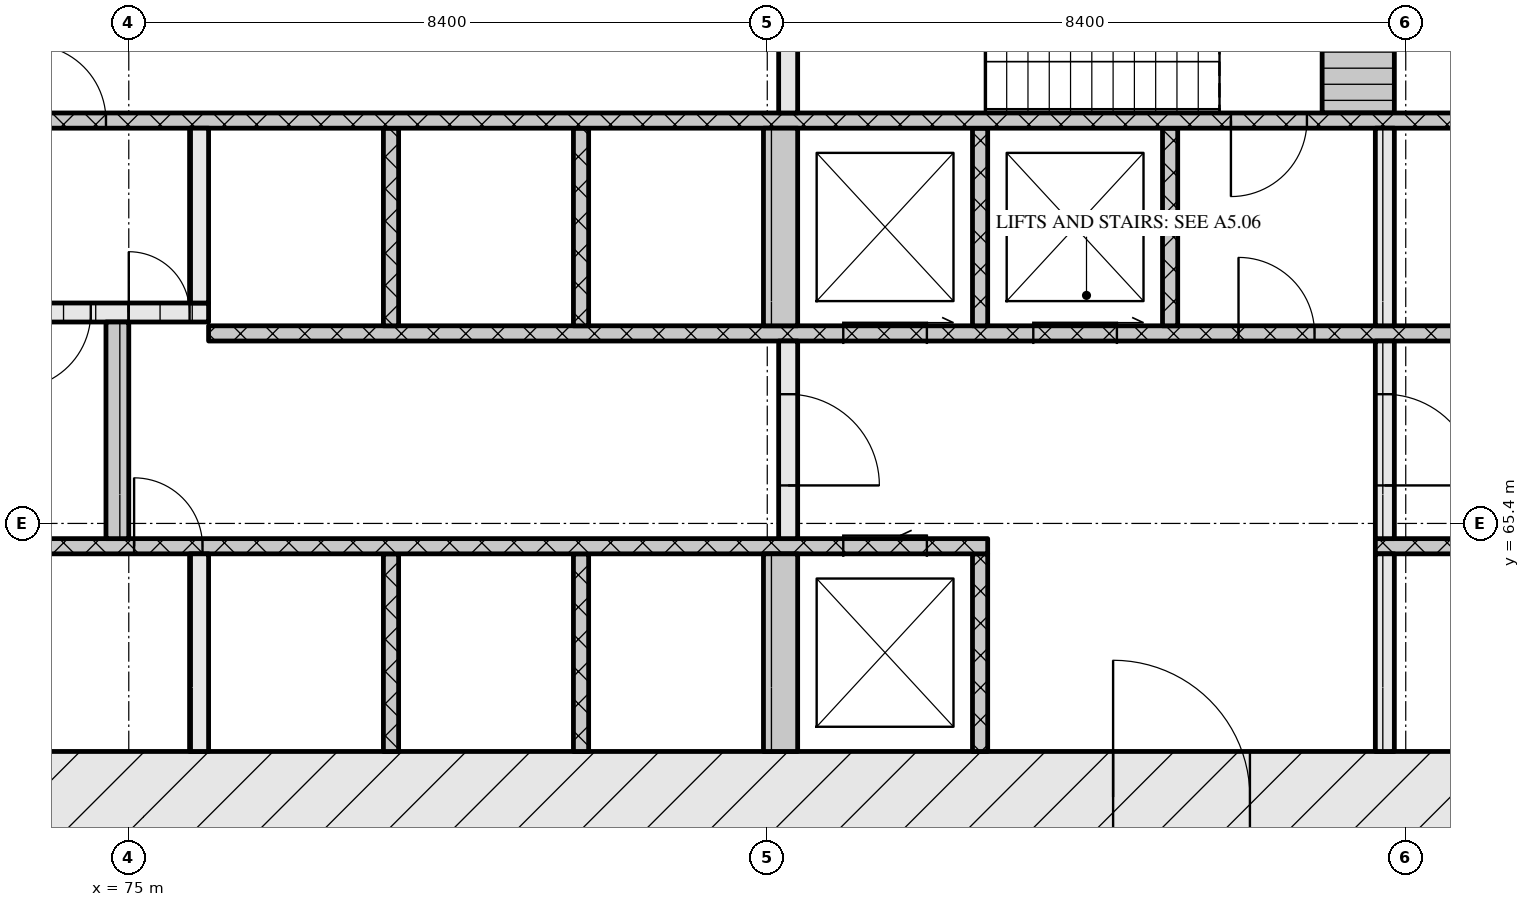
"""IFC4 building model, lengths in metres.
Left out: names, types, materials, properties, quantities, classifications, styles, units other than length and angle.
Written with IfcOpenShell. Run it as: python <this file> out.ifc"""

import sys

from ifc_helpers import new_model, si_unit, direction, frame, frame_2d, origin, place, context, subcontext, project, spatial, rectangle, extrude, element, fill, save


model = new_model("IFC4")
c1 = context("Model", 3, precision=1e-05, world=origin(), true_north=direction((0.0, 1.0)))
c2 = subcontext(c1, "Body", "Model", "MODEL_VIEW")
j1 = project(units=[si_unit("LENGTHUNIT", "METRE"), si_unit("PLANEANGLEUNIT", "RADIAN")], contexts=[c1])
p1 = place(None, origin())
s1 = spatial("IfcSite", under=j1, at=p1, CompositionType="ELEMENT")
p2 = place(p1, origin())
s2 = spatial("IfcBuilding", under=s1, at=p2, CompositionType="ELEMENT")
p3 = place(p2, frame((0.0, 0.0, 28.2)))
s3 = spatial("IfcBuildingStorey", under=s2, at=p3, CompositionType="ELEMENT", Elevation=28.2)
p4 = place(p3, frame((66.6, 61.8, 0.0), z_axis=(0.0, 0.0, 1.0), x_axis=(1.0, 0.0, 0.0)))
e1 = element("IfcWall", 1, at=p4, inside=s3, PredefinedType="SOLIDWALL", context=c2, shape_type="SweptSolid", body=[
    extrude(rectangle(XDim=42.0, YDim=1.2, at=frame_2d((21.0, 0.0))), origin(), (0.0, 0.0, 1.0), 4.2),
])
p5 = place(p4, frame((21.35, 0.0, 0.0)))
e2 = element("IfcOpeningElement", 2, at=p5, cuts=e1, PredefinedType="OPENING", context=c2, shape_type="SweptSolid", body=[
    extrude(rectangle(XDim=1.8, YDim=2.1, at=frame_2d((0.9, 1.05))), frame((0.0, 0.61, 0.0), z_axis=(0.0, -1.0, 0.0), x_axis=(1.0, 0.0, 0.0)), (0.0, 0.0, 1.0), 1.22),
])
p6 = place(p3, frame((75.925, 62.4, 0.0), z_axis=(0.0, 0.0, 1.0), x_axis=(0.0, 1.0, 0.0)))
e3 = element("IfcWall", 3, at=p6, inside=s3, PredefinedType="SOLIDWALL", context=c2, shape_type="SweptSolid", body=[
    extrude(rectangle(XDim=2.6, YDim=0.25, at=frame_2d((1.3, 0.0))), origin(), (0.0, 0.0, 1.0), 4.2),
])
for number, where, z_axis, x_axis in (
    (4, (78.45, 62.4, 0.0), (0.0, 0.0, 1.0), (0.0, 1.0, 0.0)),
    (5, (80.95, 62.4, 0.0), (0.0, 0.0, 1.0), (0.0, 1.0, 0.0)),
):
    element("IfcWall", number, at=place(p3, frame(where, z_axis=z_axis, x_axis=x_axis)), inside=s3, PredefinedType="SOLIDWALL", context=c2, shape_type="SweptSolid", body=[
        extrude(rectangle(XDim=2.6, YDim=0.2, at=frame_2d((1.3, 0.0))), origin(), (0.0, 0.0, 1.0), 4.2),
    ])
p7 = place(p3, frame((83.575, 62.4, 0.0), z_axis=(0.0, 0.0, 1.0), x_axis=(0.0, 1.0, 0.0)))
e6 = element("IfcWall", 6, at=p7, inside=s3, PredefinedType="SOLIDWALL", context=c2, shape_type="SweptSolid", body=[
    extrude(rectangle(XDim=2.6, YDim=0.45, at=frame_2d((1.3, 0.0))), origin(), (0.0, 0.0, 1.0), 4.2),
])
p8 = place(p3, frame((86.2, 62.4, 0.0), z_axis=(0.0, 0.0, 1.0), x_axis=(0.0, 1.0, 0.0)))
e7 = element("IfcWall", 7, at=p8, inside=s3, PredefinedType="SOLIDWALL", context=c2, shape_type="SweptSolid", body=[
    extrude(rectangle(XDim=2.6, YDim=0.2, at=frame_2d((1.3, 0.0))), origin(), (0.0, 0.0, 1.0), 4.2),
])
p9 = place(p3, frame((91.525, 62.4, 0.0), z_axis=(0.0, 0.0, 1.0), x_axis=(0.0, 1.0, 0.0)))
e8 = element("IfcWall", 8, at=p9, inside=s3, PredefinedType="SOLIDWALL", context=c2, shape_type="SweptSolid", body=[
    extrude(rectangle(XDim=2.6, YDim=0.25, at=frame_2d((1.3, 0.0))), origin(), (0.0, 0.0, 1.0), 4.2),
])
p10 = place(p3, frame((67.8, 65.1, 0.0), z_axis=(0.0, 0.0, 1.0), x_axis=(1.0, 0.0, 0.0)))
e9 = element("IfcWall", 9, at=p10, inside=s3, PredefinedType="SOLIDWALL", context=c2, shape_type="SweptSolid", body=[
    extrude(rectangle(XDim=18.5, YDim=0.2, at=frame_2d((9.25, 0.0))), origin(), (0.0, 0.0, 1.0), 4.2),
])
p11 = place(p10, frame((7.27, 0.0, 0.0)))
e10 = element("IfcOpeningElement", 10, at=p11, cuts=e9, PredefinedType="OPENING", context=c2, shape_type="SweptSolid", body=[
    extrude(rectangle(XDim=0.9, YDim=2.1, at=frame_2d((0.45, 1.05))), frame((0.0, 0.11, 0.0), z_axis=(0.0, -1.0, 0.0), x_axis=(1.0, 0.0, 0.0)), (0.0, 0.0, 1.0), 0.22),
])
p12 = place(p10, frame((16.6, 0.0, 0.0)))
e11 = element("IfcOpeningElement", 11, at=p12, cuts=e9, PredefinedType="OPENING", context=c2, shape_type="SweptSolid", body=[
    extrude(rectangle(XDim=1.1, YDim=2.1, at=frame_2d((0.55, 1.05))), frame((0.0, 0.11, 0.0), z_axis=(0.0, -1.0, 0.0), x_axis=(1.0, 0.0, 0.0)), (0.0, 0.0, 1.0), 0.22),
])
p13 = place(p3, frame((91.4, 65.1, 0.0), z_axis=(0.0, 0.0, 1.0), x_axis=(1.0, 0.0, 0.0)))
e12 = element("IfcWall", 12, at=p13, inside=s3, PredefinedType="SOLIDWALL", context=c2, shape_type="SweptSolid", body=[
    extrude(rectangle(XDim=16.0, YDim=0.2, at=frame_2d((8.0, 0.0))), origin(), (0.0, 0.0, 1.0), 4.2),
])
p14 = place(p13, frame((7.83, 0.0, 0.0)))
e13 = element("IfcOpeningElement", 13, at=p14, cuts=e12, PredefinedType="OPENING", context=c2, shape_type="SweptSolid", body=[
    extrude(rectangle(XDim=0.9, YDim=2.1, at=frame_2d((0.45, 1.05))), frame((0.0, 0.11, 0.0), z_axis=(0.0, -1.0, 0.0), x_axis=(1.0, 0.0, 0.0)), (0.0, 0.0, 1.0), 0.22),
])
p15 = place(p3, frame((74.85, 65.2, 0.0), z_axis=(0.0, 0.0, 1.0), x_axis=(0.0, 1.0, 0.0)))
e14 = element("IfcWall", 14, at=p15, inside=s3, PredefinedType="SOLIDWALL", context=c2, shape_type="SweptSolid", body=[
    extrude(rectangle(XDim=2.85, YDim=0.3, at=frame_2d((1.425, 0.0))), origin(), (0.0, 0.0, 1.0), 4.2),
])
p16 = place(p3, frame((83.675, 65.2, 0.0), z_axis=(0.0, 0.0, 1.0), x_axis=(0.0, 1.0, 0.0)))
e15 = element("IfcWall", 15, at=p16, inside=s3, PredefinedType="SOLIDWALL", context=c2, shape_type="SweptSolid", body=[
    extrude(rectangle(XDim=2.6, YDim=0.25, at=frame_2d((1.3, 0.0))), origin(), (0.0, 0.0, 1.0), 4.2),
])
p17 = place(p16, frame((0.7, 0.0, 0.0)))
e16 = element("IfcOpeningElement", 16, at=p17, cuts=e15, PredefinedType="OPENING", context=c2, shape_type="SweptSolid", body=[
    extrude(rectangle(XDim=1.2, YDim=2.1, at=frame_2d((0.6, 1.05))), frame((0.0, 0.135, 0.0), z_axis=(0.0, -1.0, 0.0), x_axis=(1.0, 0.0, 0.0)), (0.0, 0.0, 1.0), 0.27),
])
p18 = place(p3, frame((91.525, 65.2, 0.0), z_axis=(0.0, 0.0, 1.0), x_axis=(0.0, 1.0, 0.0)))
e17 = element("IfcWall", 17, at=p18, inside=s3, PredefinedType="SOLIDWALL", context=c2, shape_type="SweptSolid", body=[
    extrude(rectangle(XDim=2.6, YDim=0.25, at=frame_2d((1.3, 0.0))), origin(), (0.0, 0.0, 1.0), 4.2),
])
p19 = place(p18, frame((0.7, 0.0, 0.0)))
e18 = element("IfcOpeningElement", 18, at=p19, cuts=e17, PredefinedType="OPENING", context=c2, shape_type="SweptSolid", body=[
    extrude(rectangle(XDim=1.2, YDim=2.1, at=frame_2d((0.6, 1.05))), frame((0.0, 0.135, 0.0), z_axis=(0.0, -1.0, 0.0), x_axis=(1.0, 0.0, 0.0)), (0.0, 0.0, 1.0), 0.27),
])
p20 = place(p3, frame((76.05, 67.9, 0.0), z_axis=(0.0, 0.0, 1.0), x_axis=(1.0, 0.0, 0.0)))
e19 = element("IfcWall", 19, at=p20, inside=s3, PredefinedType="SOLIDWALL", context=c2, shape_type="SweptSolid", body=[
    extrude(rectangle(XDim=23.1, YDim=0.2, at=frame_2d((11.55, 0.0))), origin(), (0.0, 0.0, 1.0), 4.2),
])
p21 = place(p20, frame((8.35, 0.0, 0.0)))
e20 = element("IfcOpeningElement", 20, at=p21, cuts=e19, PredefinedType="OPENING", context=c2, shape_type="SweptSolid", body=[
    extrude(rectangle(XDim=1.1, YDim=2.1, at=frame_2d((0.55, 1.05))), frame((0.0, 0.11, 0.0), z_axis=(0.0, -1.0, 0.0), x_axis=(1.0, 0.0, 0.0)), (0.0, 0.0, 1.0), 0.22),
])
p22 = place(p20, frame((10.85, 0.0, 0.0)))
e21 = element("IfcOpeningElement", 21, at=p22, cuts=e19, PredefinedType="OPENING", context=c2, shape_type="SweptSolid", body=[
    extrude(rectangle(XDim=1.1, YDim=2.1, at=frame_2d((0.55, 1.05))), frame((0.0, 0.11, 0.0), z_axis=(0.0, -1.0, 0.0), x_axis=(1.0, 0.0, 0.0)), (0.0, 0.0, 1.0), 0.22),
])
p23 = place(p20, frame((13.55, 0.0, 0.0)))
e22 = element("IfcOpeningElement", 22, at=p23, cuts=e19, PredefinedType="OPENING", context=c2, shape_type="SweptSolid", body=[
    extrude(rectangle(XDim=1.0, YDim=2.1, at=frame_2d((0.5, 1.05))), frame((0.0, 0.11, 0.0), z_axis=(0.0, -1.0, 0.0), x_axis=(1.0, 0.0, 0.0)), (0.0, 0.0, 1.0), 0.22),
])
for number, where, z_axis, x_axis in (
    (23, (78.45, 68.0, 0.0), (0.0, 0.0, 1.0), (0.0, 1.0, 0.0)),
    (24, (80.95, 68.0, 0.0), (0.0, 0.0, 1.0), (0.0, 1.0, 0.0)),
):
    element("IfcWall", number, at=place(p3, frame(where, z_axis=z_axis, x_axis=x_axis)), inside=s3, PredefinedType="SOLIDWALL", context=c2, shape_type="SweptSolid", body=[
        extrude(rectangle(XDim=2.6, YDim=0.2, at=frame_2d((1.3, 0.0))), origin(), (0.0, 0.0, 1.0), 4.2),
    ])
p24 = place(p3, frame((83.575, 68.0, 0.0), z_axis=(0.0, 0.0, 1.0), x_axis=(0.0, 1.0, 0.0)))
e25 = element("IfcWall", 25, at=p24, inside=s3, PredefinedType="SOLIDWALL", context=c2, shape_type="SweptSolid", body=[
    extrude(rectangle(XDim=2.6, YDim=0.45, at=frame_2d((1.3, 0.0))), origin(), (0.0, 0.0, 1.0), 4.2),
])
for number, where, z_axis, x_axis in (
    (26, (86.2, 68.0, 0.0), (0.0, 0.0, 1.0), (0.0, 1.0, 0.0)),
    (27, (88.7, 68.0, 0.0), (0.0, 0.0, 1.0), (0.0, 1.0, 0.0)),
):
    element("IfcWall", number, at=place(p3, frame(where, z_axis=z_axis, x_axis=x_axis)), inside=s3, PredefinedType="SOLIDWALL", context=c2, shape_type="SweptSolid", body=[
        extrude(rectangle(XDim=2.6, YDim=0.2, at=frame_2d((1.3, 0.0))), origin(), (0.0, 0.0, 1.0), 4.2),
    ])
p25 = place(p3, frame((91.525, 68.0, 0.0), z_axis=(0.0, 0.0, 1.0), x_axis=(0.0, 1.0, 0.0)))
e28 = element("IfcWall", 28, at=p25, inside=s3, PredefinedType="SOLIDWALL", context=c2, shape_type="SweptSolid", body=[
    extrude(rectangle(XDim=2.6, YDim=0.25, at=frame_2d((1.3, 0.0))), origin(), (0.0, 0.0, 1.0), 4.2),
])
p26 = place(p3, frame((67.8, 68.175, 0.0), z_axis=(0.0, 0.0, 1.0), x_axis=(1.0, 0.0, 0.0)))
e29 = element("IfcWall", 29, at=p26, inside=s3, PredefinedType="SOLIDWALL", context=c2, shape_type="SweptSolid", body=[
    extrude(rectangle(XDim=8.25, YDim=0.25, at=frame_2d((4.125, 0.0))), origin(), (0.0, 0.0, 1.0), 4.2),
])
p27 = place(p26, frame((5.7, 0.0, 0.0)))
e30 = element("IfcOpeningElement", 30, at=p27, cuts=e29, PredefinedType="OPENING", context=c2, shape_type="SweptSolid", body=[
    extrude(rectangle(XDim=1.0, YDim=2.1, at=frame_2d((0.5, 1.05))), frame((0.0, 0.135, 0.0), z_axis=(0.0, -1.0, 0.0), x_axis=(1.0, 0.0, 0.0)), (0.0, 0.0, 1.0), 0.27),
])
p28 = place(p26, frame((7.2, 0.0, 0.0)))
e31 = element("IfcOpeningElement", 31, at=p28, cuts=e29, PredefinedType="OPENING", context=c2, shape_type="SweptSolid", body=[
    extrude(rectangle(XDim=0.8, YDim=2.1, at=frame_2d((0.4, 1.05))), frame((0.0, 0.135, 0.0), z_axis=(0.0, -1.0, 0.0), x_axis=(1.0, 0.0, 0.0)), (0.0, 0.0, 1.0), 0.27),
])
p29 = place(p3, frame((75.925, 68.3, 0.0), z_axis=(0.0, 0.0, 1.0), x_axis=(0.0, 1.0, 0.0)))
e32 = element("IfcWall", 32, at=p29, inside=s3, PredefinedType="SOLIDWALL", context=c2, shape_type="SweptSolid", body=[
    extrude(rectangle(XDim=2.3, YDim=0.25, at=frame_2d((1.15, 0.0))), origin(), (0.0, 0.0, 1.0), 4.2),
])
p30 = place(p3, frame((67.8, 70.7, 0.0), z_axis=(0.0, 0.0, 1.0), x_axis=(1.0, 0.0, 0.0)))
e33 = element("IfcWall", 33, at=p30, inside=s3, PredefinedType="SOLIDWALL", context=c2, shape_type="SweptSolid", body=[
    extrude(rectangle(XDim=39.6, YDim=0.2, at=frame_2d((19.8, 0.0))), origin(), (0.0, 0.0, 1.0), 4.2),
])
p31 = place(p30, frame((0.65, 0.0, 0.0)))
e34 = element("IfcOpeningElement", 34, at=p31, cuts=e33, PredefinedType="OPENING", context=c2, shape_type="SweptSolid", body=[
    extrude(rectangle(XDim=1.1, YDim=2.1, at=frame_2d((0.55, 1.05))), frame((0.0, 0.11, 0.0), z_axis=(0.0, -1.0, 0.0), x_axis=(1.0, 0.0, 0.0)), (0.0, 0.0, 1.0), 0.22),
])
p32 = place(p30, frame((3.25, 0.0, 0.0)))
e35 = element("IfcOpeningElement", 35, at=p32, cuts=e33, PredefinedType="OPENING", context=c2, shape_type="SweptSolid", body=[
    extrude(rectangle(XDim=1.1, YDim=2.1, at=frame_2d((0.55, 1.05))), frame((0.0, 0.11, 0.0), z_axis=(0.0, -1.0, 0.0), x_axis=(1.0, 0.0, 0.0)), (0.0, 0.0, 1.0), 0.22),
])
p33 = place(p30, frame((5.9, 0.0, 0.0)))
e36 = element("IfcOpeningElement", 36, at=p33, cuts=e33, PredefinedType="OPENING", context=c2, shape_type="SweptSolid", body=[
    extrude(rectangle(XDim=1.0, YDim=2.1, at=frame_2d((0.5, 1.05))), frame((0.0, 0.11, 0.0), z_axis=(0.0, -1.0, 0.0), x_axis=(1.0, 0.0, 0.0)), (0.0, 0.0, 1.0), 0.22),
])
p34 = place(p30, frame((21.7, 0.0, 0.0)))
e37 = element("IfcOpeningElement", 37, at=p34, cuts=e33, PredefinedType="OPENING", context=c2, shape_type="SweptSolid", body=[
    extrude(rectangle(XDim=1.0, YDim=2.1, at=frame_2d((0.5, 1.05))), frame((0.0, 0.11, 0.0), z_axis=(0.0, -1.0, 0.0), x_axis=(1.0, 0.0, 0.0)), (0.0, 0.0, 1.0), 0.22),
])
p35 = place(p30, frame((32.7, 0.0, 0.0)))
e38 = element("IfcOpeningElement", 38, at=p35, cuts=e33, PredefinedType="OPENING", context=c2, shape_type="SweptSolid", body=[
    extrude(rectangle(XDim=1.0, YDim=2.1, at=frame_2d((0.5, 1.05))), frame((0.0, 0.11, 0.0), z_axis=(0.0, -1.0, 0.0), x_axis=(1.0, 0.0, 0.0)), (0.0, 0.0, 1.0), 0.22),
])
p36 = place(p30, frame((35.25, 0.0, 0.0)))
e39 = element("IfcOpeningElement", 39, at=p36, cuts=e33, PredefinedType="OPENING", context=c2, shape_type="SweptSolid", body=[
    extrude(rectangle(XDim=1.1, YDim=2.1, at=frame_2d((0.55, 1.05))), frame((0.0, 0.11, 0.0), z_axis=(0.0, -1.0, 0.0), x_axis=(1.0, 0.0, 0.0)), (0.0, 0.0, 1.0), 0.22),
])
p37 = place(p30, frame((37.85, 0.0, 0.0)))
e40 = element("IfcOpeningElement", 40, at=p37, cuts=e33, PredefinedType="OPENING", context=c2, shape_type="SweptSolid", body=[
    extrude(rectangle(XDim=1.1, YDim=2.1, at=frame_2d((0.55, 1.05))), frame((0.0, 0.11, 0.0), z_axis=(0.0, -1.0, 0.0), x_axis=(1.0, 0.0, 0.0)), (0.0, 0.0, 1.0), 0.22),
])
p38 = place(p3, frame((83.675, 70.8, 0.0), z_axis=(0.0, 0.0, 1.0), x_axis=(0.0, 1.0, 0.0)))
e41 = element("IfcWall", 41, at=p38, inside=s3, PredefinedType="SOLIDWALL", context=c2, shape_type="SweptSolid", body=[
    extrude(rectangle(XDim=1.2, YDim=0.25, at=frame_2d((0.6, 0.0))), origin(), (0.0, 0.0, 1.0), 4.2),
])
p39 = place(p3, frame((91.175, 70.8, 0.0), z_axis=(0.0, 0.0, 1.0), x_axis=(0.0, 1.0, 0.0)))
e42 = element("IfcWall", 42, at=p39, inside=s3, PredefinedType="SOLIDWALL", context=c2, shape_type="SweptSolid", body=[
    extrude(rectangle(XDim=2.95, YDim=0.95, at=frame_2d((1.475, 0.0))), origin(), (0.0, 0.0, 1.0), 4.2),
])
p40 = place(p5, origin())
e43 = element("IfcDoor", 43, at=p40, inside=s3, OperationType="DOUBLE_DOOR_SINGLE_SWING", PredefinedType="DOOR", context=c2, shape_type="SweptSolid", body=[
    extrude(rectangle(XDim=1.8, YDim=2.1, at=frame_2d((0.9, 1.05))), frame((0.0, 0.025, 0.0), z_axis=(0.0, -1.0, 0.0), x_axis=(1.0, 0.0, 0.0)), (0.0, 0.0, 1.0), 0.05),
])
fill(e2, e43)
p41 = place(p11, origin())
e44 = element("IfcDoor", 44, at=p41, inside=s3, OperationType="SINGLE_SWING_LEFT", PredefinedType="DOOR", context=c2, shape_type="SweptSolid", body=[
    extrude(rectangle(XDim=0.9, YDim=2.1, at=frame_2d((0.45, 1.05))), frame((0.0, 0.025, 0.0), z_axis=(0.0, -1.0, 0.0), x_axis=(1.0, 0.0, 0.0)), (0.0, 0.0, 1.0), 0.05),
])
fill(e10, e44)
p42 = place(p12, origin())
e45 = element("IfcDoor", 45, at=p42, inside=s3, OperationType="SLIDING_TO_LEFT", PredefinedType="DOOR", context=c2, shape_type="SweptSolid", body=[
    extrude(rectangle(XDim=1.1, YDim=2.1, at=frame_2d((0.55, 1.05))), frame((0.0, 0.025, 0.0), z_axis=(0.0, -1.0, 0.0), x_axis=(1.0, 0.0, 0.0)), (0.0, 0.0, 1.0), 0.05),
])
fill(e11, e45)
p43 = place(p17, origin())
e46 = element("IfcDoor", 46, at=p43, inside=s3, OperationType="SINGLE_SWING_RIGHT", PredefinedType="DOOR", context=c2, shape_type="SweptSolid", body=[
    extrude(rectangle(XDim=1.2, YDim=2.1, at=frame_2d((0.6, 1.05))), frame((0.0, 0.025, 0.0), z_axis=(0.0, -1.0, 0.0), x_axis=(1.0, 0.0, 0.0)), (0.0, 0.0, 1.0), 0.05),
])
fill(e16, e46)
p44 = place(p19, origin())
e47 = element("IfcDoor", 47, at=p44, inside=s3, OperationType="SINGLE_SWING_RIGHT", PredefinedType="DOOR", context=c2, shape_type="SweptSolid", body=[
    extrude(rectangle(XDim=1.2, YDim=2.1, at=frame_2d((0.6, 1.05))), frame((0.0, 0.025, 0.0), z_axis=(0.0, -1.0, 0.0), x_axis=(1.0, 0.0, 0.0)), (0.0, 0.0, 1.0), 0.05),
])
fill(e18, e47)
p45 = place(p21, origin())
e48 = element("IfcDoor", 48, at=p45, inside=s3, OperationType="SLIDING_TO_RIGHT", PredefinedType="DOOR", context=c2, shape_type="SweptSolid", body=[
    extrude(rectangle(XDim=1.1, YDim=2.1, at=frame_2d((0.55, 1.05))), frame((0.0, 0.025, 0.0), z_axis=(0.0, -1.0, 0.0), x_axis=(1.0, 0.0, 0.0)), (0.0, 0.0, 1.0), 0.05),
])
fill(e20, e48)
p46 = place(p22, origin())
e49 = element("IfcDoor", 49, at=p46, inside=s3, OperationType="SLIDING_TO_RIGHT", PredefinedType="DOOR", context=c2, shape_type="SweptSolid", body=[
    extrude(rectangle(XDim=1.1, YDim=2.1, at=frame_2d((0.55, 1.05))), frame((0.0, 0.025, 0.0), z_axis=(0.0, -1.0, 0.0), x_axis=(1.0, 0.0, 0.0)), (0.0, 0.0, 1.0), 0.05),
])
fill(e21, e49)
p47 = place(p23, origin())
e50 = element("IfcDoor", 50, at=p47, inside=s3, OperationType="SINGLE_SWING_LEFT", PredefinedType="DOOR", context=c2, shape_type="SweptSolid", body=[
    extrude(rectangle(XDim=1.0, YDim=2.1, at=frame_2d((0.5, 1.05))), frame((0.0, 0.025, 0.0), z_axis=(0.0, -1.0, 0.0), x_axis=(1.0, 0.0, 0.0)), (0.0, 0.0, 1.0), 0.05),
])
fill(e22, e50)
p48 = place(p27, origin())
e51 = element("IfcDoor", 51, at=p48, inside=s3, OperationType="SINGLE_SWING_RIGHT", PredefinedType="DOOR", context=c2, shape_type="SweptSolid", body=[
    extrude(rectangle(XDim=1.0, YDim=2.1, at=frame_2d((0.5, 1.05))), frame((0.0, 0.025, 0.0), z_axis=(0.0, -1.0, 0.0), x_axis=(1.0, 0.0, 0.0)), (0.0, 0.0, 1.0), 0.05),
])
fill(e30, e51)
p49 = place(p28, origin())
e52 = element("IfcDoor", 52, at=p49, inside=s3, OperationType="SINGLE_SWING_LEFT", PredefinedType="DOOR", context=c2, shape_type="SweptSolid", body=[
    extrude(rectangle(XDim=0.8, YDim=2.1, at=frame_2d((0.4, 1.05))), frame((0.0, 0.025, 0.0), z_axis=(0.0, -1.0, 0.0), x_axis=(1.0, 0.0, 0.0)), (0.0, 0.0, 1.0), 0.05),
])
fill(e31, e52)
p50 = place(p33, origin())
e53 = element("IfcDoor", 53, at=p50, inside=s3, OperationType="SINGLE_SWING_LEFT", PredefinedType="DOOR", context=c2, shape_type="SweptSolid", body=[
    extrude(rectangle(XDim=1.0, YDim=2.1, at=frame_2d((0.5, 1.05))), frame((0.0, 0.025, 0.0), z_axis=(0.0, -1.0, 0.0), x_axis=(1.0, 0.0, 0.0)), (0.0, 0.0, 1.0), 0.05),
])
fill(e36, e53)
p51 = place(p34, origin())
e54 = element("IfcDoor", 54, at=p51, inside=s3, OperationType="SINGLE_SWING_RIGHT", PredefinedType="DOOR", context=c2, shape_type="SweptSolid", body=[
    extrude(rectangle(XDim=1.0, YDim=2.1, at=frame_2d((0.5, 1.05))), frame((0.0, 0.025, 0.0), z_axis=(0.0, -1.0, 0.0), x_axis=(1.0, 0.0, 0.0)), (0.0, 0.0, 1.0), 0.05),
])
fill(e37, e54)
save(model, sys.argv[1])
